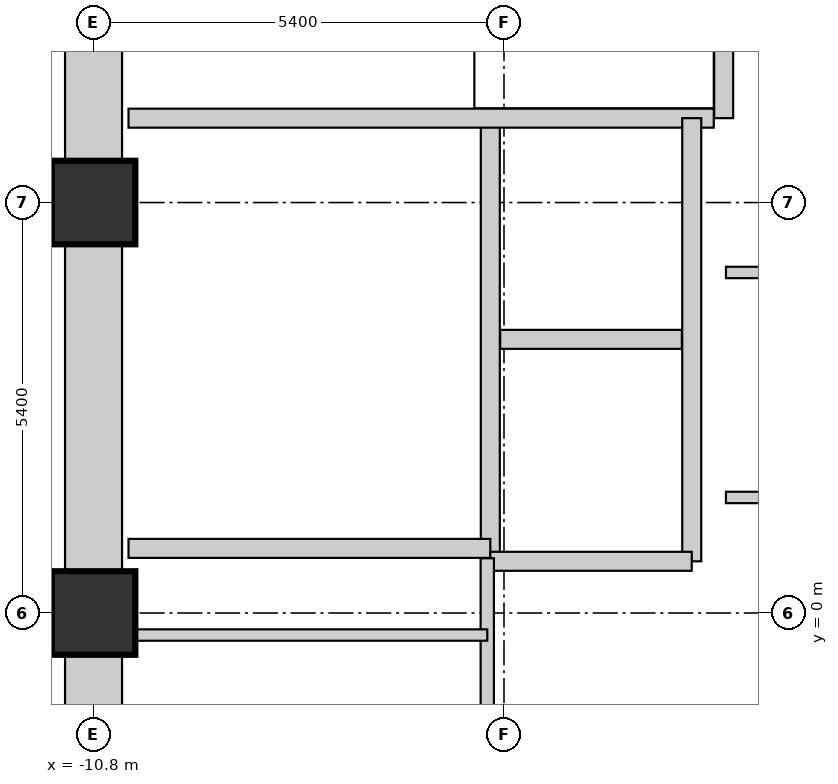
"""IFC4 building model, lengths in metres.
Left out: names, types, materials, properties, quantities, classifications, styles, units other than length and angle.
Written with IfcOpenShell. Run it as: python <this file> out.ifc"""

import sys

from ifc_helpers import new_model, si_unit, direction, frame, frame_2d, origin, origin_2d, place, context, subcontext, project, spatial, rectangle, extrude, element, fill, save


model = new_model("IFC4")
c1 = context("Model", 3, precision=1e-05, world=origin(), true_north=direction((0.0, 1.0)))
c2 = subcontext(c1, "Body", "Model", "MODEL_VIEW")
j1 = project(units=[si_unit("LENGTHUNIT", "METRE"), si_unit("PLANEANGLEUNIT", "RADIAN")], contexts=[c1])
p1 = place(None, origin())
s1 = spatial("IfcSite", under=j1, at=p1, CompositionType="ELEMENT")
p2 = place(p1, origin())
s2 = spatial("IfcBuilding", under=s1, at=p2, CompositionType="ELEMENT")
p3 = place(p2, frame((0.0, 0.0, 83.25)))
s3 = spatial("IfcBuildingStorey", under=s2, at=p3, CompositionType="ELEMENT", Elevation=83.25)
for number, where, z_axis, x_axis in (
    (1, (-10.8, 0.0, 0.0), (0.0, 0.0, 1.0), (1.0, 0.0, 0.0)),
    (2, (-10.8, 5.4, 0.0), (0.0, 0.0, 1.0), (1.0, 0.0, 0.0)),
):
    element("IfcColumn", number, at=place(p3, frame(where, z_axis=z_axis, x_axis=x_axis)), inside=s3, PredefinedType="COLUMN", context=c2, shape_type="SweptSolid", body=[
        extrude(rectangle(XDim=1.1, YDim=1.1, at=origin_2d()), origin(), (0.0, 0.0, 1.0), 3.75),
    ])
p4 = place(p3, frame((-10.8, -4.84, 0.0), z_axis=(0.0, 0.0, 1.0), x_axis=(0.0, 1.0, 0.0)))
e3 = element("IfcWall", 3, at=p4, inside=s3, PredefinedType="SHEAR", context=c2, shape_type="SweptSolid", body=[
    extrude(rectangle(XDim=4.28, YDim=0.75, at=frame_2d((2.14, 0.0))), origin(), (0.0, 0.0, 1.0), 3.75),
])
p5 = place(p4, frame((1.59, 0.0, 0.0)))
e4 = element("IfcOpeningElement", 4, at=p5, cuts=e3, PredefinedType="OPENING", context=c2, shape_type="SweptSolid", body=[
    extrude(rectangle(XDim=1.1, YDim=2.1, at=frame_2d((0.55, 1.05))), frame((0.0, 0.385, 0.0), z_axis=(0.0, -1.0, 0.0), x_axis=(1.0, 0.0, 0.0)), (0.0, 0.0, 1.0), 0.77),
])
p6 = place(p3, frame((-10.8, 0.56, 0.0), z_axis=(0.0, 0.0, 1.0), x_axis=(0.0, 1.0, 0.0)))
e5 = element("IfcWall", 5, at=p6, inside=s3, PredefinedType="SHEAR", context=c2, shape_type="SweptSolid", body=[
    extrude(rectangle(XDim=4.28, YDim=0.75, at=frame_2d((2.14, 0.0))), origin(), (0.0, 0.0, 1.0), 3.75),
])
p7 = place(p6, frame((1.59, 0.0, 0.0)))
e6 = element("IfcOpeningElement", 6, at=p7, cuts=e5, PredefinedType="OPENING", context=c2, shape_type="SweptSolid", body=[
    extrude(rectangle(XDim=1.1, YDim=2.1, at=frame_2d((0.55, 1.05))), frame((0.0, 0.385, 0.0), z_axis=(0.0, -1.0, 0.0), x_axis=(1.0, 0.0, 0.0)), (0.0, 0.0, 1.0), 0.77),
])
p8 = place(p3, frame((-10.8, 5.96, 0.0), z_axis=(0.0, 0.0, 1.0), x_axis=(0.0, 1.0, 0.0)))
e7 = element("IfcWall", 7, at=p8, inside=s3, PredefinedType="SHEAR", context=c2, shape_type="SweptSolid", body=[
    extrude(rectangle(XDim=4.28, YDim=0.75, at=frame_2d((2.14, 0.0))), origin(), (0.0, 0.0, 1.0), 3.75),
])
p9 = place(p3, frame((-5.58, 0.72, 0.0), z_axis=(0.0, 0.0, 1.0), x_axis=(0.0, 1.0, 0.0)))
e8 = element("IfcWall", 8, at=p9, inside=s3, PredefinedType="SHEAR", context=c2, shape_type="SweptSolid", body=[
    extrude(rectangle(XDim=5.79, YDim=0.25, at=frame_2d((2.895, 0.0))), origin(), (0.0, 0.0, 1.0), 3.75),
])
p10 = place(p9, frame((3.35, 0.0, 0.0)))
e9 = element("IfcOpeningElement", 9, at=p10, cuts=e8, PredefinedType="OPENING", context=c2, shape_type="SweptSolid", body=[
    extrude(rectangle(XDim=1.1, YDim=2.1, at=frame_2d((0.55, 1.05))), frame((0.0, 0.135, 0.0), z_axis=(0.0, -1.0, 0.0), x_axis=(1.0, 0.0, 0.0)), (0.0, 0.0, 1.0), 0.27),
])
p11 = place(p3, frame((-10.34, 0.85, 0.0), z_axis=(0.0, 0.0, 1.0), x_axis=(1.0, 0.0, 0.0)))
e10 = element("IfcWall", 10, at=p11, inside=s3, PredefinedType="SHEAR", context=c2, shape_type="SweptSolid", body=[
    extrude(rectangle(XDim=4.76, YDim=0.25, at=frame_2d((2.38, 0.0))), origin(), (0.0, 0.0, 1.0), 3.75),
])
p12 = place(p11, frame((1.2, 0.0, 0.0)))
e11 = element("IfcOpeningElement", 11, at=p12, cuts=e10, PredefinedType="OPENING", context=c2, shape_type="SweptSolid", body=[
    extrude(rectangle(XDim=0.85, YDim=2.1, at=frame_2d((0.425, 1.05))), frame((0.0, 0.135, 0.0), z_axis=(0.0, -1.0, 0.0), x_axis=(1.0, 0.0, 0.0)), (0.0, 0.0, 1.0), 0.27),
])
p13 = place(p3, frame((-2.51, 6.51, 0.0), z_axis=(0.0, 0.0, 1.0), x_axis=(0.0, 1.0, 0.0)))
e12 = element("IfcWall", 12, at=p13, inside=s3, PredefinedType="SHEAR", context=c2, shape_type="SweptSolid", body=[
    extrude(rectangle(XDim=3.915, YDim=0.25, at=frame_2d((1.958, 0.0))), origin(), (0.0, 0.0, 1.0), 3.75),
])
p14 = place(p3, frame((-10.34, 6.51, 0.0), z_axis=(0.0, 0.0, 1.0), x_axis=(1.0, 0.0, 0.0)))
e13 = element("IfcWall", 13, at=p14, inside=s3, PredefinedType="SHEAR", context=c2, shape_type="SweptSolid", body=[
    extrude(rectangle(XDim=7.7, YDim=0.25, at=frame_2d((3.85, 0.0))), origin(), (0.0, 0.0, 1.0), 3.75),
])
p15 = place(p14, frame((0.35, 0.0, 0.0)))
e14 = element("IfcOpeningElement", 14, at=p15, cuts=e13, PredefinedType="OPENING", context=c2, shape_type="SweptSolid", body=[
    extrude(rectangle(XDim=1.1, YDim=2.1, at=frame_2d((0.55, 1.05))), frame((0.0, 0.135, 0.0), z_axis=(0.0, -1.0, 0.0), x_axis=(1.0, 0.0, 0.0)), (0.0, 0.0, 1.0), 0.27),
])
p16 = place(p3, frame((-2.93, 0.68, 0.0), z_axis=(0.0, 0.0, 1.0), x_axis=(0.0, 1.0, 0.0)))
e15 = element("IfcWall", 15, at=p16, inside=s3, PredefinedType="SHEAR", context=c2, shape_type="SweptSolid", body=[
    extrude(rectangle(XDim=5.83, YDim=0.25, at=frame_2d((2.915, 0.0))), origin(), (0.0, 0.0, 1.0), 3.75),
])
p17 = place(p16, frame((0.75, 0.0, 0.0)))
e16 = element("IfcOpeningElement", 16, at=p17, cuts=e15, PredefinedType="OPENING", context=c2, shape_type="SweptSolid", body=[
    extrude(rectangle(XDim=1.2, YDim=2.1, at=frame_2d((0.6, 1.05))), frame((0.0, 0.135, 0.0), z_axis=(0.0, -1.0, 0.0), x_axis=(1.0, 0.0, 0.0)), (0.0, 0.0, 1.0), 0.27),
])
p18 = place(p3, frame((-5.45, 3.6, 0.0), z_axis=(0.0, 0.0, 1.0), x_axis=(1.0, 0.0, 0.0)))
e17 = element("IfcWall", 17, at=p18, inside=s3, PredefinedType="SHEAR", context=c2, shape_type="SweptSolid", body=[
    extrude(rectangle(XDim=2.39, YDim=0.25, at=frame_2d((1.195, 0.0))), origin(), (0.0, 0.0, 1.0), 3.75),
])
p19 = place(p3, frame((-5.58, 0.68, 0.0), z_axis=(0.0, 0.0, 1.0), x_axis=(1.0, 0.0, 0.0)))
e18 = element("IfcWall", 18, at=p19, inside=s3, PredefinedType="SHEAR", context=c2, shape_type="SweptSolid", body=[
    extrude(rectangle(XDim=2.65, YDim=0.25, at=frame_2d((1.325, 0.0))), origin(), (0.0, 0.0, 1.0), 3.75),
])
p20 = place(p3, frame((-5.62, -1.42, 0.0), z_axis=(0.0, 0.0, 1.0), x_axis=(0.0, 1.0, 0.0)))
e19 = element("IfcWall", 19, at=p20, inside=s3, PredefinedType="PARTITIONING", context=c2, shape_type="SweptSolid", body=[
    extrude(rectangle(XDim=2.14, YDim=0.175, at=frame_2d((1.07, 0.0))), origin(), (0.0, 0.0, 1.0), 3.57),
])
p21 = place(p3, frame((-10.34, -0.29, 0.0), z_axis=(0.0, 0.0, 1.0), x_axis=(1.0, 0.0, 0.0)))
e20 = element("IfcWall", 20, at=p21, inside=s3, PredefinedType="PARTITIONING", context=c2, shape_type="SweptSolid", body=[
    extrude(rectangle(XDim=4.72, YDim=0.15, at=frame_2d((2.36, 0.0))), origin(), (0.0, 0.0, 1.0), 3.57),
])
p22 = place(p21, frame((1.8, 0.0, 0.0)))
e21 = element("IfcOpeningElement", 21, at=p22, cuts=e20, PredefinedType="OPENING", context=c2, shape_type="SweptSolid", body=[
    extrude(rectangle(XDim=0.85, YDim=2.1, at=frame_2d((0.425, 1.05))), frame((0.0, 0.085, 0.0), z_axis=(0.0, -1.0, 0.0), x_axis=(1.0, 0.0, 0.0)), (0.0, 0.0, 1.0), 0.17),
])
for number, where, z_axis, x_axis in (
    (22, (-2.48, 4.48, 0.0), (0.0, 0.0, 1.0), (1.0, 0.0, 0.0)),
    (23, (-2.48, 1.52, 0.0), (0.0, 0.0, 1.0), (1.0, 0.0, 0.0)),
):
    element("IfcWall", number, at=place(p3, frame(where, z_axis=z_axis, x_axis=x_axis)), inside=s3, PredefinedType="PARTITIONING", context=c2, shape_type="SweptSolid", body=[
        extrude(rectangle(XDim=1.68, YDim=0.15, at=frame_2d((0.84, 0.0))), origin(), (0.0, 0.0, 1.0), 3.57),
    ])
p23 = place(p15, origin())
e24 = element("IfcDoor", 24, at=p23, inside=s3, OperationType="SINGLE_SWING_LEFT", PredefinedType="DOOR", context=c2, shape_type="SweptSolid", body=[
    extrude(rectangle(XDim=1.1, YDim=2.1, at=frame_2d((0.55, 1.05))), frame((0.0, 0.025, 0.0), z_axis=(0.0, -1.0, 0.0), x_axis=(1.0, 0.0, 0.0)), (0.0, 0.0, 1.0), 0.05),
])
fill(e14, e24)
p24 = place(p7, origin())
e25 = element("IfcDoor", 25, at=p24, inside=s3, OperationType="SINGLE_SWING_LEFT", PredefinedType="DOOR", context=c2, shape_type="SweptSolid", body=[
    extrude(rectangle(XDim=1.1, YDim=2.1, at=frame_2d((0.55, 1.05))), frame((0.0, 0.025, 0.0), z_axis=(0.0, -1.0, 0.0), x_axis=(1.0, 0.0, 0.0)), (0.0, 0.0, 1.0), 0.05),
])
fill(e6, e25)
p25 = place(p12, origin())
e26 = element("IfcDoor", 26, at=p25, inside=s3, OperationType="SINGLE_SWING_LEFT", PredefinedType="DOOR", context=c2, shape_type="SweptSolid", body=[
    extrude(rectangle(XDim=0.85, YDim=2.1, at=frame_2d((0.425, 1.05))), frame((0.0, 0.025, 0.0), z_axis=(0.0, -1.0, 0.0), x_axis=(1.0, 0.0, 0.0)), (0.0, 0.0, 1.0), 0.05),
])
fill(e11, e26)
p26 = place(p22, origin())
e27 = element("IfcDoor", 27, at=p26, inside=s3, OperationType="SINGLE_SWING_RIGHT", PredefinedType="DOOR", context=c2, shape_type="SweptSolid", body=[
    extrude(rectangle(XDim=0.85, YDim=2.1, at=frame_2d((0.425, 1.05))), frame((0.0, 0.025, 0.0), z_axis=(0.0, -1.0, 0.0), x_axis=(1.0, 0.0, 0.0)), (0.0, 0.0, 1.0), 0.05),
])
fill(e21, e27)
p27 = place(p10, origin())
e28 = element("IfcDoor", 28, at=p27, inside=s3, OperationType="SLIDING_TO_LEFT", PredefinedType="DOOR", context=c2, shape_type="SweptSolid", body=[
    extrude(rectangle(XDim=1.1, YDim=2.1, at=frame_2d((0.55, 1.05))), frame((0.0, 0.025, 0.0), z_axis=(0.0, -1.0, 0.0), x_axis=(1.0, 0.0, 0.0)), (0.0, 0.0, 1.0), 0.05),
])
fill(e9, e28)
p28 = place(p17, origin())
e29 = element("IfcDoor", 29, at=p28, inside=s3, OperationType="SLIDING_TO_LEFT", PredefinedType="DOOR", context=c2, shape_type="SweptSolid", body=[
    extrude(rectangle(XDim=1.2, YDim=2.1, at=frame_2d((0.6, 1.05))), frame((0.0, 0.025, 0.0), z_axis=(0.0, -1.0, 0.0), x_axis=(1.0, 0.0, 0.0)), (0.0, 0.0, 1.0), 0.05),
])
fill(e16, e29)
save(model, sys.argv[1])
